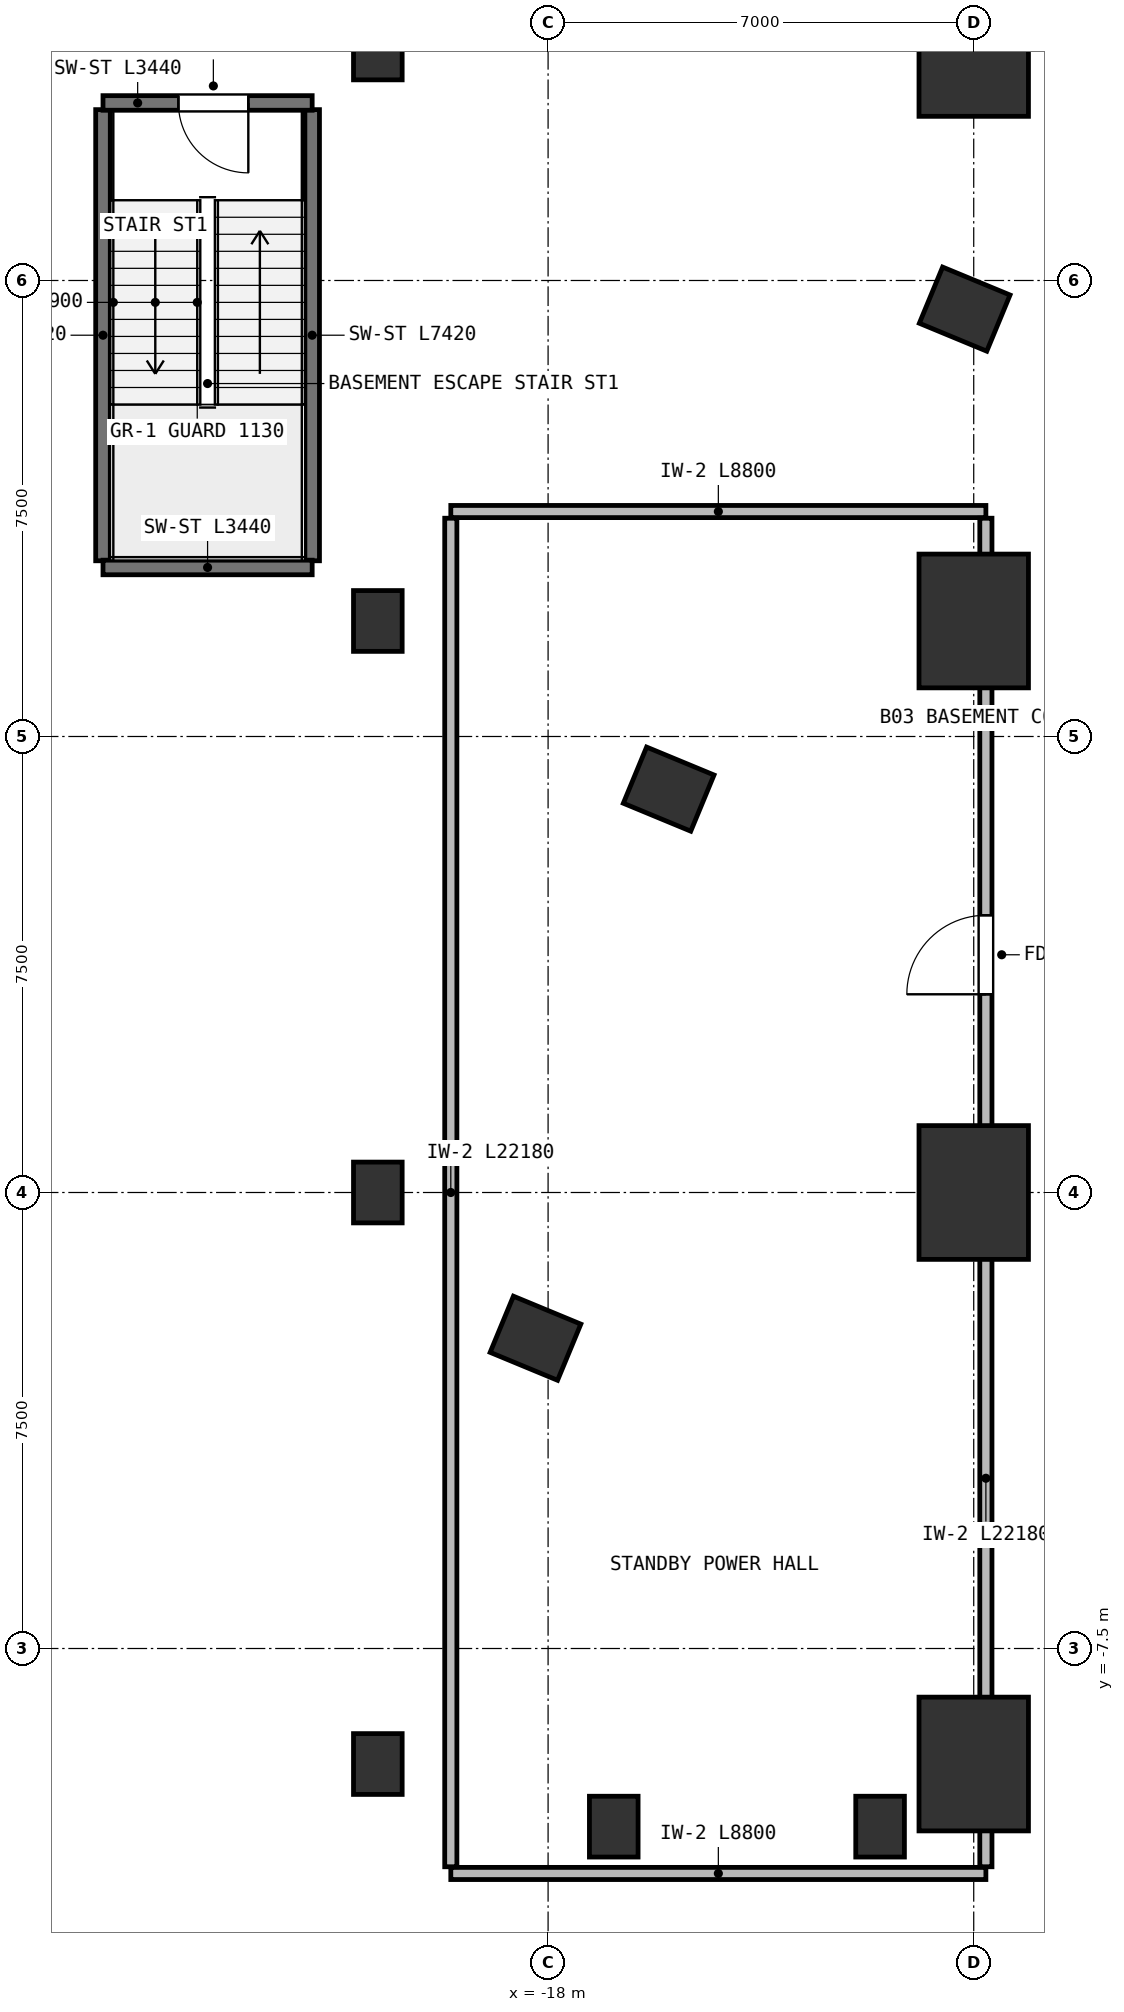
"""IFC4 building model, lengths in metres.
Left out: names, types, materials, properties, quantities, classifications, styles, units other than length and angle.
Written with IfcOpenShell. Run it as: python <this file> out.ifc"""

import sys

from ifc_helpers import new_model, si_unit, direction, frame, frame_2d, origin, origin_2d, place, context, subcontext, project, spatial, rectangle, extrude, element, fill, save


model = new_model("IFC4")
c1 = context("Model", 3, precision=1e-05, world=origin(), true_north=direction((0.0, 1.0)))
c2 = subcontext(c1, "Body", "Model", "MODEL_VIEW")
j1 = project(units=[si_unit("LENGTHUNIT", "METRE"), si_unit("PLANEANGLEUNIT", "RADIAN")], contexts=[c1])
p1 = place(None, origin())
s1 = spatial("IfcSite", under=j1, at=p1, CompositionType="ELEMENT")
p2 = place(p1, origin())
s2 = spatial("IfcBuilding", under=s1, at=p2, CompositionType="ELEMENT")
p3 = place(p2, frame((0.0, 0.0, -13.5)))
s3 = spatial("IfcBuildingStorey", under=s2, at=p3, CompositionType="ELEMENT", Elevation=-13.5)
for number, where, z_axis, x_axis in (
    (1, (-11.148, 14.529, 0.0), (0.0, 0.0, 1.0), (0.383, 0.924, 0.0)),
    (2, (-16.017, 6.635, 0.0), (0.0, 0.0, 1.0), (0.383, 0.924, 0.0)),
    (3, (-18.207, -2.397, 0.0), (0.0, 0.0, 1.0), (0.383, 0.924, 0.0)),
):
    element("IfcColumn", number, at=place(p3, frame(where, z_axis=z_axis, x_axis=x_axis)), inside=s3, PredefinedType="COLUMN", context=c2, shape_type="SweptSolid", body=[
        extrude(rectangle(XDim=1.0, YDim=1.2, at=origin_2d()), origin(), (0.0, 0.0, 1.0), 4.5),
    ])
for number, where, z_axis, x_axis in (
    (4, (-20.8, -9.4, 0.0), (0.0, 0.0, 1.0), (1.0, 0.0, 0.0)),
    (5, (-20.8, 0.0, 0.0), (0.0, 0.0, 1.0), (1.0, 0.0, 0.0)),
    (6, (-20.8, 9.4, 0.0), (0.0, 0.0, 1.0), (1.0, 0.0, 0.0)),
    (7, (-20.8, 18.8, 0.0), (0.0, 0.0, 1.0), (1.0, 0.0, 0.0)),
):
    element("IfcColumn", number, at=place(p3, frame(where, z_axis=z_axis, x_axis=x_axis)), inside=s3, PredefinedType="COLUMN", context=c2, shape_type="SweptSolid", body=[
        extrude(rectangle(XDim=0.8, YDim=1.0, at=origin_2d()), origin(), (0.0, 0.0, 1.0), 4.5),
    ])
for number, where, z_axis, x_axis in (
    (8, (-11.0, -9.4, 0.0), (0.0, 0.0, 1.0), (1.0, 0.0, 0.0)),
    (9, (-11.0, 0.0, 0.0), (0.0, 0.0, 1.0), (1.0, 0.0, 0.0)),
    (10, (-11.0, 9.4, 0.0), (0.0, 0.0, 1.0), (1.0, 0.0, 0.0)),
    (11, (-11.0, 18.8, 0.0), (0.0, 0.0, 1.0), (1.0, 0.0, 0.0)),
):
    element("IfcColumn", number, at=place(p3, frame(where, z_axis=z_axis, x_axis=x_axis)), inside=s3, PredefinedType="COLUMN", context=c2, shape_type="SweptSolid", body=[
        extrude(rectangle(XDim=1.8, YDim=2.2, at=origin_2d()), origin(), (0.0, 0.0, 1.0), 4.5),
    ])
for number, where, z_axis, x_axis in (
    (12, (-16.92, -10.43, 0.0), (0.0, 0.0, 1.0), (1.0, 0.0, 0.0)),
    (13, (-12.54, -10.43, 0.0), (0.0, 0.0, 1.0), (1.0, 0.0, 0.0)),
):
    element("IfcColumn", number, at=place(p3, frame(where, z_axis=z_axis, x_axis=x_axis)), inside=s3, PredefinedType="COLUMN", context=c2, shape_type="SweptSolid", body=[
        extrude(rectangle(XDim=0.8, YDim=1.0, at=origin_2d()), origin(), (0.0, 0.0, 1.0), 4.5),
    ])
for number, where, z_axis, x_axis in (
    (14, (-25.32, 10.39, 0.0), (0.0, 0.0, 1.0), (0.0, 1.0, 0.0)),
    (15, (-21.88, 10.39, 0.0), (0.0, 0.0, 1.0), (0.0, 1.0, 0.0)),
):
    element("IfcWall", number, at=place(p3, frame(where, z_axis=z_axis, x_axis=x_axis)), inside=s3, PredefinedType="SHEAR", context=c2, shape_type="SweptSolid", body=[
        extrude(rectangle(XDim=7.42, YDim=0.24, at=frame_2d((3.71, 0.0))), origin(), (0.0, 0.0, 1.0), 4.2),
    ])
p4 = place(p3, frame((-25.32, 10.28, 0.0), z_axis=(0.0, 0.0, 1.0), x_axis=(1.0, 0.0, 0.0)))
e16 = element("IfcWall", 16, at=p4, inside=s3, PredefinedType="SHEAR", context=c2, shape_type="SweptSolid", body=[
    extrude(rectangle(XDim=3.44, YDim=0.24, at=frame_2d((1.72, 0.0))), origin(), (0.0, 0.0, 1.0), 4.2),
])
p5 = place(p3, frame((-21.88, 17.92, 0.0), z_axis=(0.0, 0.0, 1.0), x_axis=(-1.0, 0.0, 0.0)))
e17 = element("IfcWall", 17, at=p5, inside=s3, PredefinedType="SHEAR", context=c2, shape_type="SweptSolid", body=[
    extrude(rectangle(XDim=3.44, YDim=0.24, at=frame_2d((1.72, 0.0))), origin(), (0.0, 0.0, 1.0), 4.2),
])
p6 = place(p5, frame((1.05, 0.0, 0.0)))
e18 = element("IfcOpeningElement", 18, at=p6, cuts=e17, PredefinedType="OPENING", context=c2, shape_type="SweptSolid", body=[
    extrude(rectangle(XDim=1.15, YDim=2.15, at=frame_2d((0.575, 1.075))), frame((0.0, 0.13, 0.0), z_axis=(0.0, -1.0, 0.0), x_axis=(1.0, 0.0, 0.0)), (0.0, 0.0, 1.0), 0.26),
])
for number, where, z_axis, x_axis in (
    (19, (-19.6, 11.2, 0.0), (0.0, 0.0, 1.0), (1.0, 0.0, 0.0)),
    (20, (-19.6, -11.2, 0.0), (0.0, 0.0, 1.0), (1.0, 0.0, 0.0)),
):
    element("IfcWall", number, at=place(p3, frame(where, z_axis=z_axis, x_axis=x_axis)), inside=s3, PredefinedType="PARTITIONING", context=c2, shape_type="SweptSolid", body=[
        extrude(rectangle(XDim=8.8, YDim=0.2, at=frame_2d((4.4, 0.0))), origin(), (0.0, 0.0, 1.0), 4.2),
    ])
p7 = place(p3, frame((-19.6, 11.09, 0.0), z_axis=(0.0, 0.0, 1.0), x_axis=(0.0, -1.0, 0.0)))
e21 = element("IfcWall", 21, at=p7, inside=s3, PredefinedType="PARTITIONING", context=c2, shape_type="SweptSolid", body=[
    extrude(rectangle(XDim=22.18, YDim=0.2, at=frame_2d((11.09, 0.0))), origin(), (0.0, 0.0, 1.0), 4.2),
])
p8 = place(p3, frame((-10.8, -11.09, 0.0), z_axis=(0.0, 0.0, 1.0), x_axis=(0.0, 1.0, 0.0)))
e22 = element("IfcWall", 22, at=p8, inside=s3, PredefinedType="PARTITIONING", context=c2, shape_type="SweptSolid", body=[
    extrude(rectangle(XDim=22.18, YDim=0.2, at=frame_2d((11.09, 0.0))), origin(), (0.0, 0.0, 1.0), 3.18),
])
p9 = place(p8, frame((14.35, 0.0, 0.0)))
e23 = element("IfcOpeningElement", 23, at=p9, cuts=e22, PredefinedType="OPENING", context=c2, shape_type="SweptSolid", body=[
    extrude(rectangle(XDim=1.3, YDim=2.15, at=frame_2d((0.65, 1.075))), frame((0.0, 0.11, 0.0), z_axis=(0.0, -1.0, 0.0), x_axis=(1.0, 0.0, 0.0)), (0.0, 0.0, 1.0), 0.22),
])
p10 = place(p6, origin())
e24 = element("IfcDoor", 24, at=p10, inside=s3, OperationType="SINGLE_SWING_LEFT", PredefinedType="DOOR", context=c2, shape_type="SweptSolid", body=[
    extrude(rectangle(XDim=1.15, YDim=2.15, at=frame_2d((0.575, 1.075))), frame((0.0, 0.025, 0.0), z_axis=(0.0, -1.0, 0.0), x_axis=(1.0, 0.0, 0.0)), (0.0, 0.0, 1.0), 0.05),
])
fill(e18, e24)
p11 = place(p9, origin())
e25 = element("IfcDoor", 25, at=p11, inside=s3, OperationType="SINGLE_SWING_LEFT", PredefinedType="DOOR", context=c2, shape_type="SweptSolid", body=[
    extrude(rectangle(XDim=1.3, YDim=2.15, at=frame_2d((0.65, 1.075))), frame((0.0, 0.025, 0.0), z_axis=(0.0, -1.0, 0.0), x_axis=(1.0, 0.0, 0.0)), (0.0, 0.0, 1.0), 0.05),
])
fill(e23, e25)
save(model, sys.argv[1])
